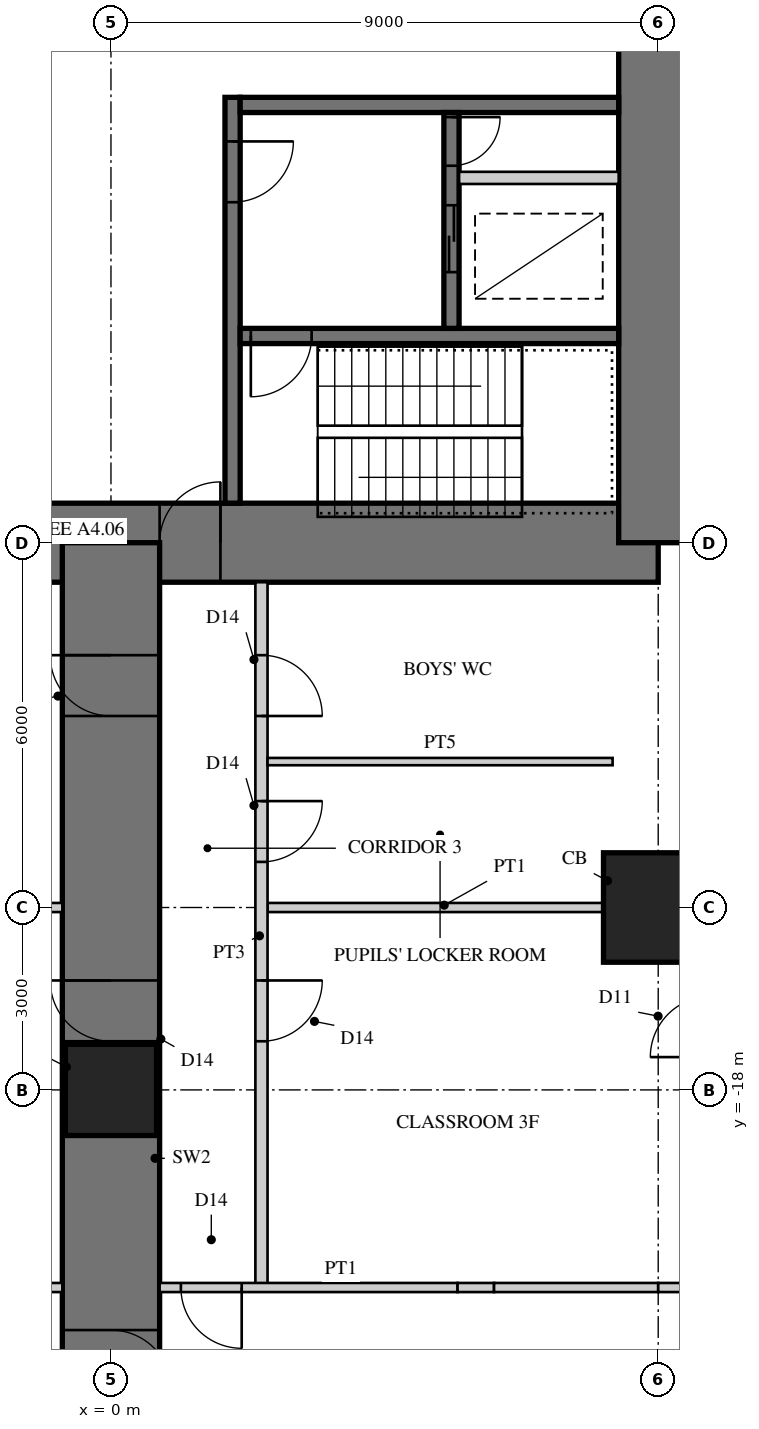
"""IFC4 building model, lengths in metres.
Left out: names, types, materials, properties, quantities, classifications, styles, units other than length and angle.
Written with IfcOpenShell. Run it as: python <this file> out.ifc"""

import sys

from ifc_helpers import new_model, si_unit, direction, frame, frame_2d, origin, origin_2d, place, context, subcontext, project, spatial, rectangle, extrude, element, fill, save


model = new_model("IFC4")
c1 = context("Model", 3, precision=1e-05, world=origin(), true_north=direction((0.0, 1.0)))
c2 = subcontext(c1, "Body", "Model", "MODEL_VIEW")
j1 = project(units=[si_unit("LENGTHUNIT", "METRE"), si_unit("PLANEANGLEUNIT", "RADIAN")], contexts=[c1])
p1 = place(None, origin())
s1 = spatial("IfcSite", under=j1, at=p1, CompositionType="ELEMENT")
p2 = place(p1, origin())
s2 = spatial("IfcBuilding", under=s1, at=p2, CompositionType="ELEMENT")
p3 = place(p2, frame((0.0, 0.0, 14.0)))
s3 = spatial("IfcBuildingStorey", under=s2, at=p3, CompositionType="ELEMENT", Elevation=14.0)
p4 = place(p3, frame((-9.0, -9.0, 0.0), z_axis=(0.0, 0.0, 1.0), x_axis=(1.0, 0.0, 0.0)))
e1 = element("IfcWall", 1, at=p4, inside=s3, PredefinedType="SHEAR", context=c2, shape_type="SweptSolid", body=[
    extrude(rectangle(XDim=18.0, YDim=1.3, at=frame_2d((9.0, 0.0))), origin(), (0.0, 0.0, 1.0), 4.5),
])
p5 = place(p4, frame((9.8, 0.0, 0.0)))
e2 = element("IfcOpeningElement", 2, at=p5, cuts=e1, PredefinedType="OPENING", context=c2, shape_type="SweptSolid", body=[
    extrude(rectangle(XDim=1.0, YDim=2.4, at=frame_2d((0.5, 1.2))), frame((0.0, 0.66, 0.0), z_axis=(0.0, -1.0, 0.0), x_axis=(1.0, 0.0, 0.0)), (0.0, 0.0, 1.0), 1.32),
])
p6 = place(p3, frame((9.0, -9.0, 0.0), z_axis=(0.0, 0.0, 1.0), x_axis=(0.0, 1.0, 0.0)))
e3 = element("IfcWall", 3, at=p6, inside=s3, PredefinedType="SHEAR", context=c2, shape_type="SweptSolid", body=[
    extrude(rectangle(XDim=18.0, YDim=1.3, at=frame_2d((9.0, 0.0))), origin(), (0.0, 0.0, 1.0), 4.5),
])
p7 = place(p6, frame((9.8, 0.0, 0.0)))
e4 = element("IfcOpeningElement", 4, at=p7, cuts=e3, PredefinedType="OPENING", context=c2, shape_type="SweptSolid", body=[
    extrude(rectangle(XDim=1.0, YDim=2.4, at=frame_2d((0.5, 1.2))), frame((0.0, 0.66, 0.0), z_axis=(0.0, -1.0, 0.0), x_axis=(1.0, 0.0, 0.0)), (0.0, 0.0, 1.0), 1.32),
])
p8 = place(p3, frame((2.0, -1.675, 0.0), z_axis=(0.0, 0.0, 1.0), x_axis=(0.0, -1.0, 0.0)))
e5 = element("IfcWall", 5, at=p8, inside=s3, PredefinedType="SHEAR", context=c2, shape_type="SweptSolid", body=[
    extrude(rectangle(XDim=6.675, YDim=0.25, at=frame_2d((3.337, 0.0))), origin(), (0.0, 0.0, 1.0), 4.5),
])
p9 = place(p8, frame((0.725, 0.0, 0.0)))
e6 = element("IfcOpeningElement", 6, at=p9, cuts=e5, PredefinedType="OPENING", context=c2, shape_type="SweptSolid", body=[
    extrude(rectangle(XDim=1.0, YDim=2.1, at=frame_2d((0.5, 1.05))), frame((0.0, 0.135, 0.0), z_axis=(0.0, -1.0, 0.0), x_axis=(1.0, 0.0, 0.0)), (0.0, 0.0, 1.0), 0.27),
])
p10 = place(p3, frame((2.125, -1.8, 0.0), z_axis=(0.0, 0.0, 1.0), x_axis=(1.0, 0.0, 0.0)))
e7 = element("IfcWall", 7, at=p10, inside=s3, PredefinedType="SHEAR", context=c2, shape_type="SweptSolid", body=[
    extrude(rectangle(XDim=6.225, YDim=0.25, at=frame_2d((3.113, 0.0))), origin(), (0.0, 0.0, 1.0), 4.5),
])
p11 = place(p3, frame((2.125, -5.6, 0.0), z_axis=(0.0, 0.0, 1.0), x_axis=(1.0, 0.0, 0.0)))
e8 = element("IfcWall", 8, at=p11, inside=s3, PredefinedType="SHEAR", context=c2, shape_type="SweptSolid", body=[
    extrude(rectangle(XDim=6.225, YDim=0.25, at=frame_2d((3.113, 0.0))), origin(), (0.0, 0.0, 1.0), 4.5),
])
p12 = place(p11, frame((0.175, 0.0, 0.0)))
e9 = element("IfcOpeningElement", 9, at=p12, cuts=e8, PredefinedType="OPENING", context=c2, shape_type="SweptSolid", body=[
    extrude(rectangle(XDim=1.0, YDim=2.1, at=frame_2d((0.5, 1.05))), frame((0.0, 0.135, 0.0), z_axis=(0.0, -1.0, 0.0), x_axis=(1.0, 0.0, 0.0)), (0.0, 0.0, 1.0), 0.27),
])
p13 = place(p3, frame((5.6, -1.925, 0.0), z_axis=(0.0, 0.0, 1.0), x_axis=(0.0, -1.0, 0.0)))
e10 = element("IfcWall", 10, at=p13, inside=s3, PredefinedType="SHEAR", context=c2, shape_type="SweptSolid", body=[
    extrude(rectangle(XDim=3.55, YDim=0.25, at=frame_2d((1.775, 0.0))), origin(), (0.0, 0.0, 1.0), 4.5),
])
p14 = place(p13, frame((1.525, 0.0, 0.0)))
e11 = element("IfcOpeningElement", 11, at=p14, cuts=e10, PredefinedType="OPENING", context=c2, shape_type="SweptSolid", body=[
    extrude(rectangle(XDim=1.1, YDim=2.2, at=frame_2d((0.55, 1.1))), frame((0.0, 0.135, 0.0), z_axis=(0.0, -1.0, 0.0), x_axis=(1.0, 0.0, 0.0)), (0.0, 0.0, 1.0), 0.27),
])
p15 = place(p13, frame((0.075, 0.0, 0.0)))
e12 = element("IfcOpeningElement", 12, at=p15, cuts=e10, PredefinedType="OPENING", context=c2, shape_type="SweptSolid", body=[
    extrude(rectangle(XDim=0.8, YDim=2.1, at=frame_2d((0.4, 1.05))), frame((0.0, 0.135, 0.0), z_axis=(0.0, -1.0, 0.0), x_axis=(1.0, 0.0, 0.0)), (0.0, 0.0, 1.0), 0.27),
])
p16 = place(p3, frame((5.725, -3.0, 0.0), z_axis=(0.0, 0.0, 1.0), x_axis=(1.0, 0.0, 0.0)))
e13 = element("IfcWall", 13, at=p16, inside=s3, PredefinedType="PARTITIONING", context=c2, shape_type="SweptSolid", body=[
    extrude(rectangle(XDim=2.625, YDim=0.2, at=frame_2d((1.312, 0.0))), origin(), (0.0, 0.0, 1.0), 4.5),
])
p17 = place(p3, frame((0.0, -9.0, 0.0), z_axis=(0.0, 0.0, 1.0), x_axis=(0.0, -1.0, 0.0)))
e14 = element("IfcWall", 14, at=p17, inside=s3, PredefinedType="SHEAR", context=c2, shape_type="SweptSolid", body=[
    extrude(rectangle(XDim=18.0, YDim=1.6, at=frame_2d((9.0, 0.0))), origin(), (0.0, 0.0, 1.0), 4.5),
])
p18 = place(p17, frame((1.85, 0.0, 0.0)))
e15 = element("IfcOpeningElement", 15, at=p18, cuts=e14, PredefinedType="OPENING", context=c2, shape_type="SweptSolid", body=[
    extrude(rectangle(XDim=1.0, YDim=2.2, at=frame_2d((0.5, 1.1))), frame((0.0, 0.81, 0.0), z_axis=(0.0, -1.0, 0.0), x_axis=(1.0, 0.0, 0.0)), (0.0, 0.0, 1.0), 1.62),
])
p19 = place(p17, frame((7.2, 0.0, 0.0)))
e16 = element("IfcOpeningElement", 16, at=p19, cuts=e14, PredefinedType="OPENING", context=c2, shape_type="SweptSolid", body=[
    extrude(rectangle(XDim=1.0, YDim=2.2, at=frame_2d((0.5, 1.1))), frame((0.0, 0.81, 0.0), z_axis=(0.0, -1.0, 0.0), x_axis=(1.0, 0.0, 0.0)), (0.0, 0.0, 1.0), 1.62),
])
p20 = place(p17, frame((12.95, 0.0, 0.0)))
e17 = element("IfcOpeningElement", 17, at=p20, cuts=e14, PredefinedType="OPENING", context=c2, shape_type="SweptSolid", body=[
    extrude(rectangle(XDim=1.0, YDim=2.2, at=frame_2d((0.5, 1.1))), frame((0.0, 0.81, 0.0), z_axis=(0.0, -1.0, 0.0), x_axis=(1.0, 0.0, 0.0)), (0.0, 0.0, 1.0), 1.62),
])
p21 = place(p3, frame((9.0, -15.0, 0.0), z_axis=(0.0, 0.0, 1.0), x_axis=(1.0, 0.0, 0.0)))
e18 = element("IfcColumn", 18, at=p21, inside=s3, PredefinedType="COLUMN", context=c2, shape_type="SweptSolid", body=[
    extrude(rectangle(XDim=1.8, YDim=1.8, at=origin_2d()), origin(), (0.0, 0.0, 1.0), 4.5),
])
p22 = place(p3, frame((0.0, -18.0, 0.0), z_axis=(0.0, 0.0, 1.0), x_axis=(1.0, 0.0, 0.0)))
e19 = element("IfcColumn", 19, at=p22, inside=s3, PredefinedType="COLUMN", context=c2, shape_type="SweptSolid", body=[
    extrude(rectangle(XDim=1.5, YDim=1.5, at=origin_2d()), origin(), (0.0, 0.0, 1.0), 4.5),
])
p23 = place(p3, frame((2.575, -15.0, 0.0), z_axis=(0.0, 0.0, 1.0), x_axis=(1.0, 0.0, 0.0)))
e20 = element("IfcWall", 20, at=p23, inside=s3, PredefinedType="PARTITIONING", context=c2, shape_type="SweptSolid", body=[
    extrude(rectangle(XDim=5.675, YDim=0.15, at=frame_2d((2.837, 0.0))), origin(), (0.0, 0.0, 1.0), 3.2),
])
p24 = place(p3, frame((-8.25, -15.0, 0.0), z_axis=(0.0, 0.0, 1.0), x_axis=(1.0, 0.0, 0.0)))
e21 = element("IfcWall", 21, at=p24, inside=s3, PredefinedType="PARTITIONING", context=c2, shape_type="SweptSolid", body=[
    extrude(rectangle(XDim=7.45, YDim=0.15, at=frame_2d((3.725, 0.0))), origin(), (0.0, 0.0, 1.0), 3.2),
])
p25 = place(p3, frame((2.475, -9.65, 0.0), z_axis=(0.0, 0.0, 1.0), x_axis=(0.0, -1.0, 0.0)))
e22 = element("IfcWall", 22, at=p25, inside=s3, PredefinedType="SOLIDWALL", context=c2, shape_type="SweptSolid", body=[
    extrude(rectangle(XDim=11.6, YDim=0.2, at=frame_2d((5.8, 0.0))), origin(), (0.0, 0.0, 1.0), 4.25),
])
p26 = place(p25, frame((1.2, 0.0, 0.0)))
e23 = element("IfcOpeningElement", 23, at=p26, cuts=e22, PredefinedType="OPENING", context=c2, shape_type="SweptSolid", body=[
    extrude(rectangle(XDim=1.0, YDim=2.2, at=frame_2d((0.5, 1.1))), frame((0.0, 0.11, 0.0), z_axis=(0.0, -1.0, 0.0), x_axis=(1.0, 0.0, 0.0)), (0.0, 0.0, 1.0), 0.22),
])
p27 = place(p25, frame((3.6, 0.0, 0.0)))
e24 = element("IfcOpeningElement", 24, at=p27, cuts=e22, PredefinedType="OPENING", context=c2, shape_type="SweptSolid", body=[
    extrude(rectangle(XDim=1.0, YDim=2.2, at=frame_2d((0.5, 1.1))), frame((0.0, 0.11, 0.0), z_axis=(0.0, -1.0, 0.0), x_axis=(1.0, 0.0, 0.0)), (0.0, 0.0, 1.0), 0.22),
])
p28 = place(p25, frame((6.55, 0.0, 0.0)))
e25 = element("IfcOpeningElement", 25, at=p28, cuts=e22, PredefinedType="OPENING", context=c2, shape_type="SweptSolid", body=[
    extrude(rectangle(XDim=1.0, YDim=2.2, at=frame_2d((0.5, 1.1))), frame((0.0, 0.11, 0.0), z_axis=(0.0, -1.0, 0.0), x_axis=(1.0, 0.0, 0.0)), (0.0, 0.0, 1.0), 0.22),
])
p29 = place(p3, frame((-5.7, -21.25, 0.0), z_axis=(0.0, 0.0, 1.0), x_axis=(1.0, 0.0, 0.0)))
e26 = element("IfcWall", 26, at=p29, inside=s3, PredefinedType="PARTITIONING", context=c2, shape_type="SweptSolid", body=[
    extrude(rectangle(XDim=4.9, YDim=0.15, at=frame_2d((2.45, 0.0))), origin(), (0.0, 0.0, 1.0), 3.3),
])
p30 = place(p3, frame((0.8, -21.25, 0.0), z_axis=(0.0, 0.0, 1.0), x_axis=(1.0, 0.0, 0.0)))
e27 = element("IfcWall", 27, at=p30, inside=s3, PredefinedType="PARTITIONING", context=c2, shape_type="SweptSolid", body=[
    extrude(rectangle(XDim=4.9, YDim=0.15, at=frame_2d((2.45, 0.0))), origin(), (0.0, 0.0, 1.0), 3.3),
])
p31 = place(p30, frame((0.35, 0.0, 0.0)))
e28 = element("IfcOpeningElement", 28, at=p31, cuts=e27, PredefinedType="OPENING", context=c2, shape_type="SweptSolid", body=[
    extrude(rectangle(XDim=1.0, YDim=2.2, at=frame_2d((0.5, 1.1))), frame((0.0, 0.085, 0.0), z_axis=(0.0, -1.0, 0.0), x_axis=(1.0, 0.0, 0.0)), (0.0, 0.0, 1.0), 0.17),
])
p32 = place(p3, frame((5.7, -21.25, 0.0), z_axis=(0.0, 0.0, 1.0), x_axis=(1.0, 0.0, 0.0)))
e29 = element("IfcWall", 29, at=p32, inside=s3, PredefinedType="PARTITIONING", context=c2, shape_type="SweptSolid", body=[
    extrude(rectangle(XDim=0.6, YDim=0.15, at=frame_2d((0.3, 0.0))), origin(), (0.0, 0.0, 1.0), 4.25),
])
p33 = place(p3, frame((6.3, -21.25, 0.0), z_axis=(0.0, 0.0, 1.0), x_axis=(1.0, 0.0, 0.0)))
e30 = element("IfcWall", 30, at=p33, inside=s3, PredefinedType="PARTITIONING", context=c2, shape_type="SweptSolid", body=[
    extrude(rectangle(XDim=2.7, YDim=0.15, at=frame_2d((1.35, 0.0))), origin(), (0.0, 0.0, 1.0), 3.3),
])
p34 = place(p3, frame((9.0, -21.25, 0.0), z_axis=(0.0, 0.0, 1.0), x_axis=(1.0, 0.0, 0.0)))
e31 = element("IfcWall", 31, at=p34, inside=s3, PredefinedType="PARTITIONING", context=c2, shape_type="SweptSolid", body=[
    extrude(rectangle(XDim=0.72, YDim=0.15, at=frame_2d((0.36, 0.0))), origin(), (0.0, 0.0, 1.0), 4.25),
])
p35 = place(p3, frame((2.575, -12.6, 0.0), z_axis=(0.0, 0.0, 1.0), x_axis=(1.0, 0.0, 0.0)))
e32 = element("IfcWall", 32, at=p35, inside=s3, PredefinedType="PLUMBINGWALL", context=c2, shape_type="SweptSolid", body=[
    extrude(rectangle(XDim=5.675, YDim=0.12, at=frame_2d((2.837, 0.0))), origin(), (0.0, 0.0, 1.0), 4.25),
])
p36 = place(p26, origin())
e33 = element("IfcDoor", 33, at=p36, inside=s3, OperationType="SINGLE_SWING_RIGHT", PredefinedType="DOOR", context=c2, shape_type="SweptSolid", body=[
    extrude(rectangle(XDim=1.0, YDim=2.2, at=frame_2d((0.5, 1.1))), frame((0.0, 0.025, 0.0), z_axis=(0.0, -1.0, 0.0), x_axis=(1.0, 0.0, 0.0)), (0.0, 0.0, 1.0), 0.05),
])
fill(e23, e33)
p37 = place(p27, origin())
e34 = element("IfcDoor", 34, at=p37, inside=s3, OperationType="SINGLE_SWING_LEFT", PredefinedType="DOOR", context=c2, shape_type="SweptSolid", body=[
    extrude(rectangle(XDim=1.0, YDim=2.2, at=frame_2d((0.5, 1.1))), frame((0.0, 0.025, 0.0), z_axis=(0.0, -1.0, 0.0), x_axis=(1.0, 0.0, 0.0)), (0.0, 0.0, 1.0), 0.05),
])
fill(e24, e34)
p38 = place(p28, origin())
e35 = element("IfcDoor", 35, at=p38, inside=s3, OperationType="SINGLE_SWING_LEFT", PredefinedType="DOOR", context=c2, shape_type="SweptSolid", body=[
    extrude(rectangle(XDim=1.0, YDim=2.2, at=frame_2d((0.5, 1.1))), frame((0.0, 0.025, 0.0), z_axis=(0.0, -1.0, 0.0), x_axis=(1.0, 0.0, 0.0)), (0.0, 0.0, 1.0), 0.05),
])
fill(e25, e35)
p39 = place(p31, frame((1.0, 0.0, 0.0), z_axis=(0.0, 0.0, 1.0), x_axis=(-1.0, 0.0, 0.0)))
e36 = element("IfcDoor", 36, at=p39, inside=s3, OperationType="SINGLE_SWING_LEFT", PredefinedType="DOOR", context=c2, shape_type="SweptSolid", body=[
    extrude(rectangle(XDim=1.0, YDim=2.2, at=frame_2d((0.5, 1.1))), frame((0.0, 0.025, 0.0), z_axis=(0.0, -1.0, 0.0), x_axis=(1.0, 0.0, 0.0)), (0.0, 0.0, 1.0), 0.05),
])
fill(e28, e36)
p40 = place(p18, frame((1.0, 0.0, 0.0), z_axis=(0.0, 0.0, 1.0), x_axis=(-1.0, 0.0, 0.0)))
e37 = element("IfcDoor", 37, at=p40, inside=s3, OperationType="SINGLE_SWING_RIGHT", PredefinedType="DOOR", context=c2, shape_type="SweptSolid", body=[
    extrude(rectangle(XDim=1.0, YDim=2.2, at=frame_2d((0.5, 1.1))), frame((0.0, 0.025, 0.0), z_axis=(0.0, -1.0, 0.0), x_axis=(1.0, 0.0, 0.0)), (0.0, 0.0, 1.0), 0.05),
])
fill(e15, e37)
p41 = place(p19, frame((1.0, 0.0, 0.0), z_axis=(0.0, 0.0, 1.0), x_axis=(-1.0, 0.0, 0.0)))
e38 = element("IfcDoor", 38, at=p41, inside=s3, OperationType="SINGLE_SWING_RIGHT", PredefinedType="DOOR", context=c2, shape_type="SweptSolid", body=[
    extrude(rectangle(XDim=1.0, YDim=2.2, at=frame_2d((0.5, 1.1))), frame((0.0, 0.025, 0.0), z_axis=(0.0, -1.0, 0.0), x_axis=(1.0, 0.0, 0.0)), (0.0, 0.0, 1.0), 0.05),
])
fill(e16, e38)
p42 = place(p20, origin())
e39 = element("IfcDoor", 39, at=p42, inside=s3, OperationType="SINGLE_SWING_RIGHT", PredefinedType="DOOR", context=c2, shape_type="SweptSolid", body=[
    extrude(rectangle(XDim=1.0, YDim=2.2, at=frame_2d((0.5, 1.1))), frame((0.0, 0.025, 0.0), z_axis=(0.0, -1.0, 0.0), x_axis=(1.0, 0.0, 0.0)), (0.0, 0.0, 1.0), 0.05),
])
fill(e17, e39)
p43 = place(p5, origin())
e40 = element("IfcDoor", 40, at=p43, inside=s3, OperationType="SINGLE_SWING_RIGHT", PredefinedType="DOOR", context=c2, shape_type="SweptSolid", body=[
    extrude(rectangle(XDim=1.0, YDim=2.4, at=frame_2d((0.5, 1.2))), frame((0.0, 0.055, 0.0), z_axis=(0.0, -1.0, 0.0), x_axis=(1.0, 0.0, 0.0)), (0.0, 0.0, 1.0), 0.05),
])
fill(e2, e40)
p44 = place(p9, origin())
e41 = element("IfcDoor", 41, at=p44, inside=s3, OperationType="SINGLE_SWING_LEFT", PredefinedType="DOOR", context=c2, shape_type="SweptSolid", body=[
    extrude(rectangle(XDim=1.0, YDim=2.1, at=frame_2d((0.5, 1.05))), frame((0.0, 0.025, 0.0), z_axis=(0.0, -1.0, 0.0), x_axis=(1.0, 0.0, 0.0)), (0.0, 0.0, 1.0), 0.05),
])
fill(e6, e41)
p45 = place(p12, frame((1.0, 0.0, 0.0), z_axis=(0.0, 0.0, 1.0), x_axis=(-1.0, 0.0, 0.0)))
e42 = element("IfcDoor", 42, at=p45, inside=s3, OperationType="SINGLE_SWING_RIGHT", PredefinedType="DOOR", context=c2, shape_type="SweptSolid", body=[
    extrude(rectangle(XDim=1.0, YDim=2.1, at=frame_2d((0.5, 1.05))), frame((0.0, 0.025, 0.0), z_axis=(0.0, -1.0, 0.0), x_axis=(1.0, 0.0, 0.0)), (0.0, 0.0, 1.0), 0.05),
])
fill(e9, e42)
p46 = place(p14, origin())
e43 = element("IfcDoor", 43, at=p46, inside=s3, OperationType="DOUBLE_DOOR_SLIDING", PredefinedType="DOOR", context=c2, shape_type="SweptSolid", body=[
    extrude(rectangle(XDim=1.1, YDim=2.2, at=frame_2d((0.55, 1.1))), frame((0.0, 0.025, 0.0), z_axis=(0.0, -1.0, 0.0), x_axis=(1.0, 0.0, 0.0)), (0.0, 0.0, 1.0), 0.05),
])
fill(e11, e43)
p47 = place(p15, origin())
e44 = element("IfcDoor", 44, at=p47, inside=s3, OperationType="SINGLE_SWING_LEFT", PredefinedType="DOOR", context=c2, shape_type="SweptSolid", body=[
    extrude(rectangle(XDim=0.8, YDim=2.1, at=frame_2d((0.4, 1.05))), frame((0.0, 0.025, 0.0), z_axis=(0.0, -1.0, 0.0), x_axis=(1.0, 0.0, 0.0)), (0.0, 0.0, 1.0), 0.05),
])
fill(e12, e44)
save(model, sys.argv[1])
